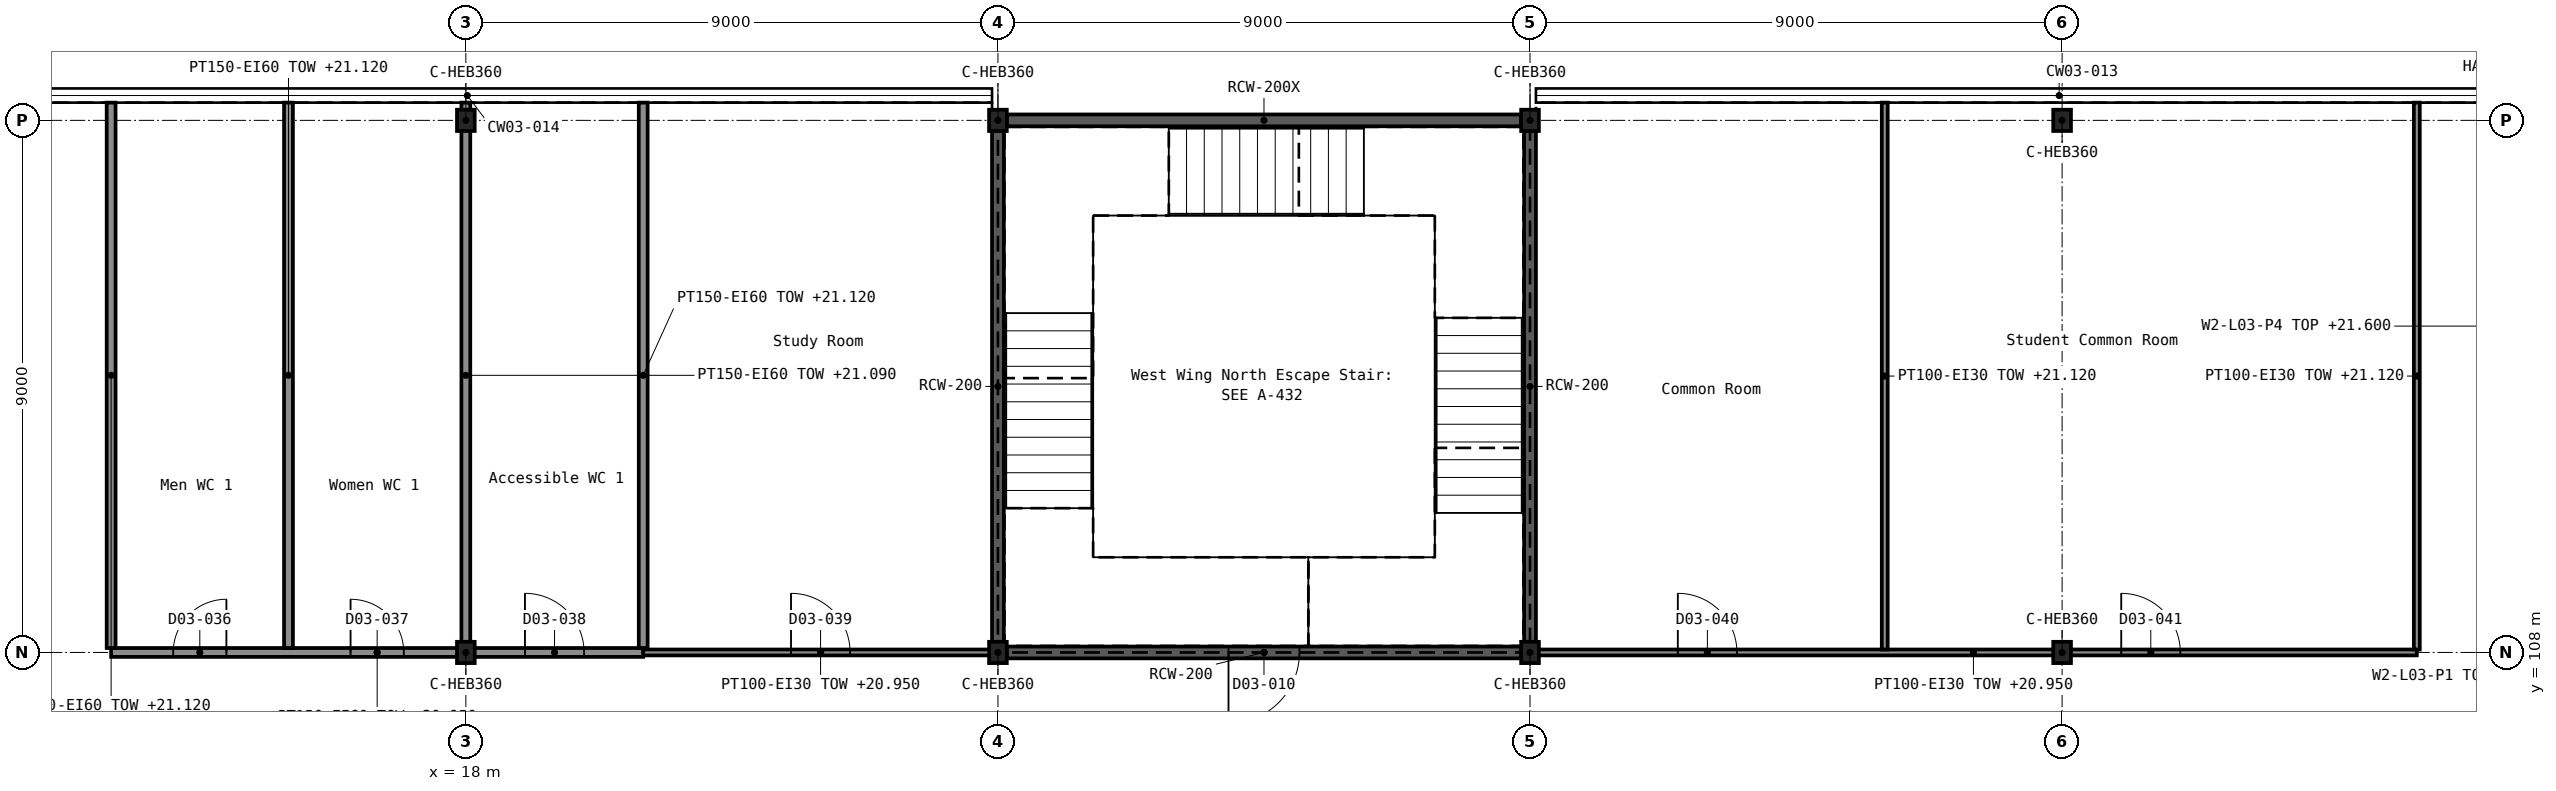
"""IFC4 building model, lengths in metres.
Left out: names, types, materials, properties, quantities, classifications, styles, units other than length and angle.
Written with IfcOpenShell. Run it as: python <this file> out.ifc"""

import sys

from ifc_helpers import new_model, si_unit, direction, frame, frame_2d, origin, origin_2d, place, context, subcontext, project, spatial, rectangle, i_section, extrude, element, fill, save


model = new_model("IFC4")
c1 = context("Model", 3, precision=1e-05, world=origin(), true_north=direction((0.0, 1.0)))
c2 = subcontext(c1, "Body", "Model", "MODEL_VIEW")
j1 = project(units=[si_unit("LENGTHUNIT", "METRE"), si_unit("PLANEANGLEUNIT", "RADIAN")], contexts=[c1])
p1 = place(None, origin())
s1 = spatial("IfcSite", under=j1, at=p1, CompositionType="ELEMENT")
p2 = place(p1, origin())
s2 = spatial("IfcBuilding", under=s1, at=p2, CompositionType="ELEMENT")
p3 = place(p2, frame((0.0, 0.0, 16.2)))
s3 = spatial("IfcBuildingStorey", under=s2, at=p3, CompositionType="ELEMENT", Elevation=16.2)
for number, where, z_axis, x_axis in (
    (1, (18.0, 108.0, 0.0), (0.0, 0.0, 1.0), (1.0, 0.0, 0.0)),
    (2, (27.0, 108.0, 0.0), (0.0, 0.0, 1.0), (1.0, 0.0, 0.0)),
    (3, (36.0, 108.0, 0.0), (0.0, 0.0, 1.0), (1.0, 0.0, 0.0)),
    (4, (45.0, 108.0, 0.0), (0.0, 0.0, 1.0), (1.0, 0.0, 0.0)),
    (5, (18.0, 117.0, 0.0), (0.0, 0.0, 1.0), (1.0, 0.0, 0.0)),
    (6, (27.0, 117.0, 0.0), (0.0, 0.0, 1.0), (1.0, 0.0, 0.0)),
    (7, (36.0, 117.0, 0.0), (0.0, 0.0, 1.0), (1.0, 0.0, 0.0)),
    (8, (45.0, 117.0, 0.0), (0.0, 0.0, 1.0), (1.0, 0.0, 0.0)),
):
    element("IfcColumn", number, at=place(p3, frame(where, z_axis=z_axis, x_axis=x_axis)), inside=s3, PredefinedType="COLUMN", context=c2, shape_type="SweptSolid", body=[
        extrude(i_section(OverallWidth=0.3, OverallDepth=0.36, WebThickness=0.012, FlangeThickness=0.022, FilletRadius=0.027, at=origin_2d()), origin(), (0.0, 0.0, 1.0), 5.4),
    ])
p4 = place(p3, frame((27.15, 108.0, 0.0), z_axis=(0.0, 0.0, 1.0), x_axis=(1.0, 0.0, 0.0)))
e9 = element("IfcWall", 9, at=p4, inside=s3, PredefinedType="SHEAR", context=c2, shape_type="SweptSolid", body=[
    extrude(rectangle(XDim=8.7, YDim=0.2, at=frame_2d((4.35, 0.0))), origin(), (0.0, 0.0, 1.0), 5.4),
])
p5 = place(p4, frame((3.75, 0.0, 0.0)))
e10 = element("IfcOpeningElement", 10, at=p5, cuts=e9, PredefinedType="OPENING", context=c2, shape_type="SweptSolid", body=[
    extrude(rectangle(XDim=1.2, YDim=2.1, at=frame_2d((0.6, 1.05))), frame((0.0, 0.111, 0.0), z_axis=(0.0, -1.0, 0.0), x_axis=(1.0, 0.0, 0.0)), (0.0, 0.0, 1.0), 0.222),
])
p6 = place(p3, frame((27.15, 117.0, 0.0), z_axis=(0.0, 0.0, 1.0), x_axis=(1.0, 0.0, 0.0)))
e11 = element("IfcWall", 11, at=p6, inside=s3, PredefinedType="SHEAR", context=c2, shape_type="SweptSolid", body=[
    extrude(rectangle(XDim=8.7, YDim=0.2, at=frame_2d((4.35, 0.0))), origin(), (0.0, 0.0, 1.0), 5.4),
])
for number, where, z_axis, x_axis in (
    (12, (27.0, 108.18, 0.0), (0.0, 0.0, 1.0), (0.0, 1.0, 0.0)),
    (13, (36.0, 108.18, 0.0), (0.0, 0.0, 1.0), (0.0, 1.0, 0.0)),
):
    element("IfcWall", number, at=place(p3, frame(where, z_axis=z_axis, x_axis=x_axis)), inside=s3, PredefinedType="SHEAR", context=c2, shape_type="SweptSolid", body=[
        extrude(rectangle(XDim=8.64, YDim=0.2, at=frame_2d((4.32, 0.0))), origin(), (0.0, 0.0, 1.0), 5.4),
    ])
p7 = place(p3, frame((12.0, 108.0, 0.0), z_axis=(0.0, 0.0, 1.0), x_axis=(1.0, 0.0, 0.0)))
e14 = element("IfcWall", 14, at=p7, inside=s3, PredefinedType="PARTITIONING", context=c2, shape_type="SweptSolid", body=[
    extrude(rectangle(XDim=9.0, YDim=0.15, at=frame_2d((4.5, 0.0))), origin(), (0.0, 0.0, 1.0), 4.75),
])
p8 = place(p7, frame((1.05, 0.0, 0.0)))
e15 = element("IfcOpeningElement", 15, at=p8, cuts=e14, PredefinedType="OPENING", context=c2, shape_type="SweptSolid", body=[
    extrude(rectangle(XDim=0.9, YDim=2.1, at=frame_2d((0.45, 1.05))), frame((0.0, 0.086, 0.0), z_axis=(0.0, -1.0, 0.0), x_axis=(1.0, 0.0, 0.0)), (0.0, 0.0, 1.0), 0.172),
])
p9 = place(p7, frame((4.05, 0.0, 0.0)))
e16 = element("IfcOpeningElement", 16, at=p9, cuts=e14, PredefinedType="OPENING", context=c2, shape_type="SweptSolid", body=[
    extrude(rectangle(XDim=0.9, YDim=2.1, at=frame_2d((0.45, 1.05))), frame((0.0, 0.086, 0.0), z_axis=(0.0, -1.0, 0.0), x_axis=(1.0, 0.0, 0.0)), (0.0, 0.0, 1.0), 0.172),
])
p10 = place(p7, frame((7.0, 0.0, 0.0)))
e17 = element("IfcOpeningElement", 17, at=p10, cuts=e14, PredefinedType="OPENING", context=c2, shape_type="SweptSolid", body=[
    extrude(rectangle(XDim=1.0, YDim=2.1, at=frame_2d((0.5, 1.05))), frame((0.0, 0.086, 0.0), z_axis=(0.0, -1.0, 0.0), x_axis=(1.0, 0.0, 0.0)), (0.0, 0.0, 1.0), 0.172),
])
for number, where, z_axis, x_axis in (
    (18, (12.0, 108.075, 0.0), (0.0, 0.0, 1.0), (0.0, 1.0, 0.0)),
    (19, (15.0, 108.075, 0.0), (0.0, 0.0, 1.0), (0.0, 1.0, 0.0)),
):
    element("IfcWall", number, at=place(p3, frame(where, z_axis=z_axis, x_axis=x_axis)), inside=s3, PredefinedType="PARTITIONING", context=c2, shape_type="SweptSolid", body=[
        extrude(rectangle(XDim=9.225, YDim=0.15, at=frame_2d((4.613, 0.0))), origin(), (0.0, 0.0, 1.0), 4.92),
    ])
p11 = place(p3, frame((18.0, 108.075, 0.0), z_axis=(0.0, 0.0, 1.0), x_axis=(0.0, 1.0, 0.0)))
e20 = element("IfcWall", 20, at=p11, inside=s3, PredefinedType="PARTITIONING", context=c2, shape_type="SweptSolid", body=[
    extrude(rectangle(XDim=9.225, YDim=0.15, at=frame_2d((4.613, 0.0))), origin(), (0.0, 0.0, 1.0), 4.89),
])
p12 = place(p3, frame((21.0, 108.075, 0.0), z_axis=(0.0, 0.0, 1.0), x_axis=(0.0, 1.0, 0.0)))
e21 = element("IfcWall", 21, at=p12, inside=s3, PredefinedType="PARTITIONING", context=c2, shape_type="SweptSolid", body=[
    extrude(rectangle(XDim=9.225, YDim=0.15, at=frame_2d((4.613, 0.0))), origin(), (0.0, 0.0, 1.0), 4.92),
])
p13 = place(p3, frame((21.0, 108.0, 0.0), z_axis=(0.0, 0.0, 1.0), x_axis=(1.0, 0.0, 0.0)))
e22 = element("IfcWall", 22, at=p13, inside=s3, PredefinedType="PARTITIONING", context=c2, shape_type="SweptSolid", body=[
    extrude(rectangle(XDim=6.0, YDim=0.1, at=frame_2d((3.0, 0.0))), origin(), (0.0, 0.0, 1.0), 4.75),
])
p14 = place(p13, frame((2.5, 0.0, 0.0)))
e23 = element("IfcOpeningElement", 23, at=p14, cuts=e22, PredefinedType="OPENING", context=c2, shape_type="SweptSolid", body=[
    extrude(rectangle(XDim=1.0, YDim=2.1, at=frame_2d((0.5, 1.05))), frame((0.0, 0.061, 0.0), z_axis=(0.0, -1.0, 0.0), x_axis=(1.0, 0.0, 0.0)), (0.0, 0.0, 1.0), 0.122),
])
p15 = place(p3, frame((36.0, 108.0, 0.0), z_axis=(0.0, 0.0, 1.0), x_axis=(1.0, 0.0, 0.0)))
e24 = element("IfcWall", 24, at=p15, inside=s3, PredefinedType="PARTITIONING", context=c2, shape_type="SweptSolid", body=[
    extrude(rectangle(XDim=15.0, YDim=0.1, at=frame_2d((7.5, 0.0))), origin(), (0.0, 0.0, 1.0), 4.75),
])
p16 = place(p15, frame((2.5, 0.0, 0.0)))
e25 = element("IfcOpeningElement", 25, at=p16, cuts=e24, PredefinedType="OPENING", context=c2, shape_type="SweptSolid", body=[
    extrude(rectangle(XDim=1.0, YDim=2.1, at=frame_2d((0.5, 1.05))), frame((0.0, 0.061, 0.0), z_axis=(0.0, -1.0, 0.0), x_axis=(1.0, 0.0, 0.0)), (0.0, 0.0, 1.0), 0.122),
])
p17 = place(p15, frame((10.0, 0.0, 0.0)))
e26 = element("IfcOpeningElement", 26, at=p17, cuts=e24, PredefinedType="OPENING", context=c2, shape_type="SweptSolid", body=[
    extrude(rectangle(XDim=1.0, YDim=2.1, at=frame_2d((0.5, 1.05))), frame((0.0, 0.061, 0.0), z_axis=(0.0, -1.0, 0.0), x_axis=(1.0, 0.0, 0.0)), (0.0, 0.0, 1.0), 0.122),
])
for number, where, z_axis, x_axis in (
    (27, (42.0, 108.05, 0.0), (0.0, 0.0, 1.0), (0.0, 1.0, 0.0)),
    (28, (51.0, 108.05, 0.0), (0.0, 0.0, 1.0), (0.0, 1.0, 0.0)),
):
    element("IfcWall", number, at=place(p3, frame(where, z_axis=z_axis, x_axis=x_axis)), inside=s3, PredefinedType="PARTITIONING", context=c2, shape_type="SweptSolid", body=[
        extrude(rectangle(XDim=9.25, YDim=0.1, at=frame_2d((4.625, 0.0))), origin(), (0.0, 0.0, 1.0), 4.92),
    ])
p18 = place(p5, frame((1.2, 0.0, 0.0), z_axis=(0.0, 0.0, 1.0), x_axis=(-1.0, 0.0, 0.0)))
e29 = element("IfcDoor", 29, at=p18, inside=s3, OperationType="SINGLE_SWING_RIGHT", PredefinedType="DOOR", context=c2, shape_type="SweptSolid", body=[
    extrude(rectangle(XDim=1.2, YDim=2.1, at=frame_2d((0.6, 1.05))), frame((0.0, 0.025, 0.0), z_axis=(0.0, -1.0, 0.0), x_axis=(1.0, 0.0, 0.0)), (0.0, 0.0, 1.0), 0.05),
])
fill(e10, e29)
p19 = place(p8, origin())
e30 = element("IfcDoor", 30, at=p19, inside=s3, OperationType="SINGLE_SWING_RIGHT", PredefinedType="DOOR", context=c2, shape_type="SweptSolid", body=[
    extrude(rectangle(XDim=0.9, YDim=2.1, at=frame_2d((0.45, 1.05))), frame((0.0, 0.025, 0.0), z_axis=(0.0, -1.0, 0.0), x_axis=(1.0, 0.0, 0.0)), (0.0, 0.0, 1.0), 0.05),
])
fill(e15, e30)
p20 = place(p9, origin())
e31 = element("IfcDoor", 31, at=p20, inside=s3, OperationType="SINGLE_SWING_LEFT", PredefinedType="DOOR", context=c2, shape_type="SweptSolid", body=[
    extrude(rectangle(XDim=0.9, YDim=2.1, at=frame_2d((0.45, 1.05))), frame((0.0, 0.025, 0.0), z_axis=(0.0, -1.0, 0.0), x_axis=(1.0, 0.0, 0.0)), (0.0, 0.0, 1.0), 0.05),
])
fill(e16, e31)
p21 = place(p10, origin())
e32 = element("IfcDoor", 32, at=p21, inside=s3, OperationType="SINGLE_SWING_LEFT", PredefinedType="DOOR", context=c2, shape_type="SweptSolid", body=[
    extrude(rectangle(XDim=1.0, YDim=2.1, at=frame_2d((0.5, 1.05))), frame((0.0, 0.025, 0.0), z_axis=(0.0, -1.0, 0.0), x_axis=(1.0, 0.0, 0.0)), (0.0, 0.0, 1.0), 0.05),
])
fill(e17, e32)
p22 = place(p14, origin())
e33 = element("IfcDoor", 33, at=p22, inside=s3, OperationType="SINGLE_SWING_LEFT", PredefinedType="DOOR", context=c2, shape_type="SweptSolid", body=[
    extrude(rectangle(XDim=1.0, YDim=2.1, at=frame_2d((0.5, 1.05))), frame((0.0, 0.025, 0.0), z_axis=(0.0, -1.0, 0.0), x_axis=(1.0, 0.0, 0.0)), (0.0, 0.0, 1.0), 0.05),
])
fill(e23, e33)
p23 = place(p16, origin())
e34 = element("IfcDoor", 34, at=p23, inside=s3, OperationType="SINGLE_SWING_LEFT", PredefinedType="DOOR", context=c2, shape_type="SweptSolid", body=[
    extrude(rectangle(XDim=1.0, YDim=2.1, at=frame_2d((0.5, 1.05))), frame((0.0, 0.025, 0.0), z_axis=(0.0, -1.0, 0.0), x_axis=(1.0, 0.0, 0.0)), (0.0, 0.0, 1.0), 0.05),
])
fill(e25, e34)
p24 = place(p17, origin())
e35 = element("IfcDoor", 35, at=p24, inside=s3, OperationType="SINGLE_SWING_LEFT", PredefinedType="DOOR", context=c2, shape_type="SweptSolid", body=[
    extrude(rectangle(XDim=1.0, YDim=2.1, at=frame_2d((0.5, 1.05))), frame((0.0, 0.025, 0.0), z_axis=(0.0, -1.0, 0.0), x_axis=(1.0, 0.0, 0.0)), (0.0, 0.0, 1.0), 0.05),
])
fill(e26, e35)
save(model, sys.argv[1])
